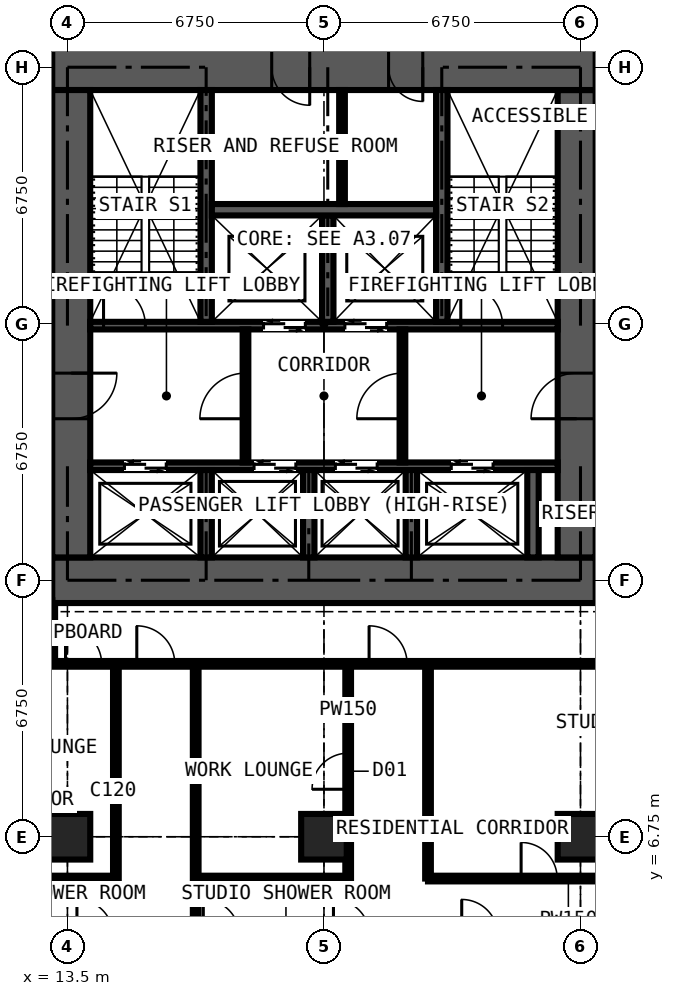
"""IFC4 building model, lengths in metres.
Left out: names, types, materials, properties, quantities, classifications, styles, units other than length and angle.
Written with IfcOpenShell. Run it as: python <this file> out.ifc"""

import sys

from ifc_helpers import new_model, si_unit, direction, frame, frame_2d, origin, origin_2d, place, context, subcontext, project, spatial, rectangle, extrude, element, fill, save


model = new_model("IFC4")
c1 = context("Model", 3, precision=1e-05, world=origin(), true_north=direction((0.0, 1.0)))
c2 = subcontext(c1, "Body", "Model", "MODEL_VIEW")
j1 = project(units=[si_unit("LENGTHUNIT", "METRE"), si_unit("PLANEANGLEUNIT", "RADIAN")], contexts=[c1])
p1 = place(None, origin())
s1 = spatial("IfcSite", under=j1, at=p1, CompositionType="ELEMENT")
p2 = place(p1, origin())
s2 = spatial("IfcBuilding", under=s1, at=p2, CompositionType="ELEMENT")
p3 = place(p2, frame((0.0, 0.0, 185.4)))
s3 = spatial("IfcBuildingStorey", under=s2, at=p3, CompositionType="ELEMENT", Elevation=185.4)
for number, where, z_axis, x_axis in (
    (1, (13.5, 6.75, 0.0), (0.0, 0.0, 1.0), (1.0, 0.0, 0.0)),
    (2, (20.25, 6.75, 0.0), (0.0, 0.0, 1.0), (1.0, 0.0, 0.0)),
    (3, (27.0, 6.75, 0.0), (0.0, 0.0, 1.0), (1.0, 0.0, 0.0)),
):
    element("IfcColumn", number, at=place(p3, frame(where, z_axis=z_axis, x_axis=x_axis)), inside=s3, PredefinedType="COLUMN", context=c2, shape_type="SweptSolid", body=[
        extrude(rectangle(XDim=1.2, YDim=1.2, at=origin_2d()), origin(), (0.0, 0.0, 1.0), 3.6),
    ])
p4 = place(p3, frame((13.1, 13.5, 0.0), z_axis=(0.0, 0.0, 1.0), x_axis=(1.0, 0.0, 0.0)))
e4 = element("IfcWall", 4, at=p4, inside=s3, PredefinedType="SHEAR", context=c2, shape_type="SweptSolid", body=[
    extrude(rectangle(XDim=14.3, YDim=1.2, at=frame_2d((7.15, 0.0))), origin(), (0.0, 0.0, 1.0), 3.6),
])
p5 = place(p3, frame((26.9, 14.1, 0.0), z_axis=(0.0, 0.0, 1.0), x_axis=(0.0, 1.0, 0.0)))
e5 = element("IfcWall", 5, at=p5, inside=s3, PredefinedType="SHEAR", context=c2, shape_type="SweptSolid", body=[
    extrude(rectangle(XDim=12.3, YDim=1.0, at=frame_2d((6.15, 0.0))), origin(), (0.0, 0.0, 1.0), 3.6),
])
p6 = place(p5, frame((3.65, 0.0, 0.0)))
e6 = element("IfcOpeningElement", 6, at=p6, cuts=e5, PredefinedType="OPENING", context=c2, shape_type="SweptSolid", body=[
    extrude(rectangle(XDim=1.2, YDim=2.2, at=frame_2d((0.6, 1.1))), frame((0.0, 0.51, 0.0), z_axis=(0.0, -1.0, 0.0), x_axis=(1.0, 0.0, 0.0)), (0.0, 0.0, 1.0), 1.02),
])
p7 = place(p3, frame((27.4, 27.0, 0.0), z_axis=(0.0, 0.0, 1.0), x_axis=(-1.0, 0.0, 0.0)))
e7 = element("IfcWall", 7, at=p7, inside=s3, PredefinedType="SHEAR", context=c2, shape_type="SweptSolid", body=[
    extrude(rectangle(XDim=14.3, YDim=1.2, at=frame_2d((7.15, 0.0))), origin(), (0.0, 0.0, 1.0), 3.6),
])
p8 = place(p7, frame((4.55, 0.0, 0.0)))
e8 = element("IfcOpeningElement", 8, at=p8, cuts=e7, PredefinedType="OPENING", context=c2, shape_type="SweptSolid", body=[
    extrude(rectangle(XDim=0.9, YDim=2.2, at=frame_2d((0.45, 1.1))), frame((0.0, 0.61, 0.0), z_axis=(0.0, -1.0, 0.0), x_axis=(1.0, 0.0, 0.0)), (0.0, 0.0, 1.0), 1.22),
])
p9 = place(p7, frame((7.525, 0.0, 0.0)))
e9 = element("IfcOpeningElement", 9, at=p9, cuts=e7, PredefinedType="OPENING", context=c2, shape_type="SweptSolid", body=[
    extrude(rectangle(XDim=1.0, YDim=2.2, at=frame_2d((0.5, 1.1))), frame((0.0, 0.61, 0.0), z_axis=(0.0, -1.0, 0.0), x_axis=(1.0, 0.0, 0.0)), (0.0, 0.0, 1.0), 1.22),
])
p10 = place(p3, frame((13.6, 26.4, 0.0), z_axis=(0.0, 0.0, 1.0), x_axis=(0.0, -1.0, 0.0)))
e10 = element("IfcWall", 10, at=p10, inside=s3, PredefinedType="SHEAR", context=c2, shape_type="SweptSolid", body=[
    extrude(rectangle(XDim=12.3, YDim=1.0, at=frame_2d((6.15, 0.0))), origin(), (0.0, 0.0, 1.0), 3.6),
])
p11 = place(p10, frame((7.45, 0.0, 0.0)))
e11 = element("IfcOpeningElement", 11, at=p11, cuts=e10, PredefinedType="OPENING", context=c2, shape_type="SweptSolid", body=[
    extrude(rectangle(XDim=1.2, YDim=2.2, at=frame_2d((0.6, 1.1))), frame((0.0, 0.51, 0.0), z_axis=(0.0, -1.0, 0.0), x_axis=(1.0, 0.0, 0.0)), (0.0, 0.0, 1.0), 1.02),
])
p12 = place(p3, frame((14.1, 16.5, 0.0), z_axis=(0.0, 0.0, 1.0), x_axis=(1.0, 0.0, 0.0)))
e12 = element("IfcWall", 12, at=p12, inside=s3, PredefinedType="SHEAR", context=c2, shape_type="SweptSolid", body=[
    extrude(rectangle(XDim=12.3, YDim=0.2, at=frame_2d((6.15, 0.0))), origin(), (0.0, 0.0, 1.0), 3.6),
])
p13 = place(p12, frame((0.9, 0.0, 0.0)))
e13 = element("IfcOpeningElement", 13, at=p13, cuts=e12, PredefinedType="OPENING", context=c2, shape_type="SweptSolid", body=[
    extrude(rectangle(XDim=1.1, YDim=2.2, at=frame_2d((0.55, 1.1))), frame((0.0, 0.11, 0.0), z_axis=(0.0, -1.0, 0.0), x_axis=(1.0, 0.0, 0.0)), (0.0, 0.0, 1.0), 0.22),
])
p14 = place(p12, frame((4.31, 0.0, 0.0)))
e14 = element("IfcOpeningElement", 14, at=p14, cuts=e12, PredefinedType="OPENING", context=c2, shape_type="SweptSolid", body=[
    extrude(rectangle(XDim=1.1, YDim=2.2, at=frame_2d((0.55, 1.1))), frame((0.0, 0.11, 0.0), z_axis=(0.0, -1.0, 0.0), x_axis=(1.0, 0.0, 0.0)), (0.0, 0.0, 1.0), 0.22),
])
p15 = place(p12, frame((6.45, 0.0, 0.0)))
e15 = element("IfcOpeningElement", 15, at=p15, cuts=e12, PredefinedType="OPENING", context=c2, shape_type="SweptSolid", body=[
    extrude(rectangle(XDim=1.1, YDim=2.2, at=frame_2d((0.55, 1.1))), frame((0.0, 0.11, 0.0), z_axis=(0.0, -1.0, 0.0), x_axis=(1.0, 0.0, 0.0)), (0.0, 0.0, 1.0), 0.22),
])
p16 = place(p12, frame((9.5, 0.0, 0.0)))
e16 = element("IfcOpeningElement", 16, at=p16, cuts=e12, PredefinedType="OPENING", context=c2, shape_type="SweptSolid", body=[
    extrude(rectangle(XDim=1.1, YDim=2.2, at=frame_2d((0.55, 1.1))), frame((0.0, 0.11, 0.0), z_axis=(0.0, -1.0, 0.0), x_axis=(1.0, 0.0, 0.0)), (0.0, 0.0, 1.0), 0.22),
])
p17 = place(p3, frame((14.1, 20.2, 0.0), z_axis=(0.0, 0.0, 1.0), x_axis=(1.0, 0.0, 0.0)))
e17 = element("IfcWall", 17, at=p17, inside=s3, PredefinedType="SHEAR", context=c2, shape_type="SweptSolid", body=[
    extrude(rectangle(XDim=12.3, YDim=0.2, at=frame_2d((6.15, 0.0))), origin(), (0.0, 0.0, 1.0), 3.6),
])
p18 = place(p17, frame((4.56, 0.0, 0.0)))
e18 = element("IfcOpeningElement", 18, at=p18, cuts=e17, PredefinedType="OPENING", context=c2, shape_type="SweptSolid", body=[
    extrude(rectangle(XDim=1.1, YDim=2.2, at=frame_2d((0.55, 1.1))), frame((0.0, 0.11, 0.0), z_axis=(0.0, -1.0, 0.0), x_axis=(1.0, 0.0, 0.0)), (0.0, 0.0, 1.0), 0.22),
])
p19 = place(p17, frame((6.7, 0.0, 0.0)))
e19 = element("IfcOpeningElement", 19, at=p19, cuts=e17, PredefinedType="OPENING", context=c2, shape_type="SweptSolid", body=[
    extrude(rectangle(XDim=1.1, YDim=2.2, at=frame_2d((0.55, 1.1))), frame((0.0, 0.11, 0.0), z_axis=(0.0, -1.0, 0.0), x_axis=(1.0, 0.0, 0.0)), (0.0, 0.0, 1.0), 0.22),
])
p20 = place(p17, frame((0.35, 0.0, 0.0)))
e20 = element("IfcOpeningElement", 20, at=p20, cuts=e17, PredefinedType="OPENING", context=c2, shape_type="SweptSolid", body=[
    extrude(rectangle(XDim=1.1, YDim=2.2, at=frame_2d((0.55, 1.1))), frame((0.0, 0.11, 0.0), z_axis=(0.0, -1.0, 0.0), x_axis=(1.0, 0.0, 0.0)), (0.0, 0.0, 1.0), 0.22),
])
p21 = place(p17, frame((9.75, 0.0, 0.0)))
e21 = element("IfcOpeningElement", 21, at=p21, cuts=e17, PredefinedType="OPENING", context=c2, shape_type="SweptSolid", body=[
    extrude(rectangle(XDim=1.1, YDim=2.2, at=frame_2d((0.55, 1.1))), frame((0.0, 0.11, 0.0), z_axis=(0.0, -1.0, 0.0), x_axis=(1.0, 0.0, 0.0)), (0.0, 0.0, 1.0), 0.22),
])
for number, where, z_axis, x_axis in (
    (22, (17.15, 20.3, 0.0), (0.0, 0.0, 1.0), (0.0, 1.0, 0.0)),
    (23, (23.35, 20.3, 0.0), (0.0, 0.0, 1.0), (0.0, 1.0, 0.0)),
):
    element("IfcWall", number, at=place(p3, frame(where, z_axis=z_axis, x_axis=x_axis)), inside=s3, PredefinedType="SHEAR", context=c2, shape_type="SweptSolid", body=[
        extrude(rectangle(XDim=6.1, YDim=0.3, at=frame_2d((3.05, 0.0))), origin(), (0.0, 0.0, 1.0), 3.6),
    ])
p22 = place(p3, frame((20.35, 20.3, 0.0), z_axis=(0.0, 0.0, 1.0), x_axis=(0.0, 1.0, 0.0)))
e24 = element("IfcWall", 24, at=p22, inside=s3, PredefinedType="SHEAR", context=c2, shape_type="SweptSolid", body=[
    extrude(rectangle(XDim=2.8, YDim=0.3, at=frame_2d((1.4, 0.0))), origin(), (0.0, 0.0, 1.0), 3.6),
])
p23 = place(p3, frame((17.3, 23.25, 0.0), z_axis=(0.0, 0.0, 1.0), x_axis=(1.0, 0.0, 0.0)))
e25 = element("IfcWall", 25, at=p23, inside=s3, PredefinedType="SHEAR", context=c2, shape_type="SweptSolid", body=[
    extrude(rectangle(XDim=5.9, YDim=0.3, at=frame_2d((2.95, 0.0))), origin(), (0.0, 0.0, 1.0), 3.6),
])
for number, where, z_axis, x_axis in (
    (26, (17.15, 14.1, 0.0), (0.0, 0.0, 1.0), (0.0, 1.0, 0.0)),
    (27, (19.85, 14.1, 0.0), (0.0, 0.0, 1.0), (0.0, 1.0, 0.0)),
    (28, (22.55, 14.1, 0.0), (0.0, 0.0, 1.0), (0.0, 1.0, 0.0)),
    (29, (25.75, 14.1, 0.0), (0.0, 0.0, 1.0), (0.0, 1.0, 0.0)),
):
    element("IfcWall", number, at=place(p3, frame(where, z_axis=z_axis, x_axis=x_axis)), inside=s3, PredefinedType="SHEAR", context=c2, shape_type="SweptSolid", body=[
        extrude(rectangle(XDim=2.3, YDim=0.3, at=frame_2d((1.15, 0.0))), origin(), (0.0, 0.0, 1.0), 3.6),
    ])
p24 = place(p3, frame((18.185, 16.6, 0.0), z_axis=(0.0, 0.0, 1.0), x_axis=(0.0, 1.0, 0.0)))
e30 = element("IfcWall", 30, at=p24, inside=s3, PredefinedType="PARTITIONING", context=c2, shape_type="SweptSolid", body=[
    extrude(rectangle(XDim=3.5, YDim=0.15, at=frame_2d((1.75, 0.0))), origin(), (0.0, 0.0, 1.0), 3.375),
])
p25 = place(p24, frame((1.15, 0.0, 0.0)))
e31 = element("IfcOpeningElement", 31, at=p25, cuts=e30, PredefinedType="OPENING", context=c2, shape_type="SweptSolid", body=[
    extrude(rectangle(XDim=1.2, YDim=2.2, at=frame_2d((0.6, 1.1))), frame((0.0, 0.085, 0.0), z_axis=(0.0, -1.0, 0.0), x_axis=(1.0, 0.0, 0.0)), (0.0, 0.0, 1.0), 0.17),
])
p26 = place(p3, frame((22.315, 16.6, 0.0), z_axis=(0.0, 0.0, 1.0), x_axis=(0.0, 1.0, 0.0)))
e32 = element("IfcWall", 32, at=p26, inside=s3, PredefinedType="PARTITIONING", context=c2, shape_type="SweptSolid", body=[
    extrude(rectangle(XDim=3.5, YDim=0.15, at=frame_2d((1.75, 0.0))), origin(), (0.0, 0.0, 1.0), 3.375),
])
p27 = place(p26, frame((1.15, 0.0, 0.0)))
e33 = element("IfcOpeningElement", 33, at=p27, cuts=e32, PredefinedType="OPENING", context=c2, shape_type="SweptSolid", body=[
    extrude(rectangle(XDim=1.2, YDim=2.2, at=frame_2d((0.6, 1.1))), frame((0.0, 0.085, 0.0), z_axis=(0.0, -1.0, 0.0), x_axis=(1.0, 0.0, 0.0)), (0.0, 0.0, 1.0), 0.17),
])
p28 = place(p3, frame((20.725, 23.4, 0.0), z_axis=(0.0, 0.0, 1.0), x_axis=(0.0, 1.0, 0.0)))
e34 = element("IfcWall", 34, at=p28, inside=s3, PredefinedType="PARTITIONING", context=c2, shape_type="SweptSolid", body=[
    extrude(rectangle(XDim=3.0, YDim=0.15, at=frame_2d((1.5, 0.0))), origin(), (0.0, 0.0, 1.0), 3.375),
])
p29 = place(p3, frame((6.75, 5.65, 0.0), z_axis=(0.0, 0.0, 1.0), x_axis=(1.0, 0.0, 0.0)))
e35 = element("IfcWall", 35, at=p29, inside=s3, PredefinedType="PARTITIONING", context=c2, shape_type="SweptSolid", body=[
    extrude(rectangle(XDim=8.025, YDim=0.15, at=frame_2d((4.012, 0.0))), origin(), (0.0, 0.0, 1.0), 3.375),
])
p30 = place(p3, frame((10.125, 11.3, 0.0), z_axis=(0.0, 0.0, 1.0), x_axis=(1.0, 0.0, 0.0)))
e36 = element("IfcWall", 36, at=p30, inside=s3, PredefinedType="PARTITIONING", context=c2, shape_type="SweptSolid", body=[
    extrude(rectangle(XDim=20.25, YDim=0.15, at=frame_2d((10.125, 0.0))), origin(), (0.0, 0.0, 1.0), 3.375),
])
p31 = place(p30, frame((5.2, 0.0, 0.0)))
e37 = element("IfcOpeningElement", 37, at=p31, cuts=e36, PredefinedType="OPENING", context=c2, shape_type="SweptSolid", body=[
    extrude(rectangle(XDim=1.0, YDim=2.2, at=frame_2d((0.5, 1.1))), frame((0.0, 0.085, 0.0), z_axis=(0.0, -1.0, 0.0), x_axis=(1.0, 0.0, 0.0)), (0.0, 0.0, 1.0), 0.17),
])
p32 = place(p30, frame((11.312, 0.0, 0.0)))
e38 = element("IfcOpeningElement", 38, at=p32, cuts=e36, PredefinedType="OPENING", context=c2, shape_type="SweptSolid", body=[
    extrude(rectangle(XDim=1.0, YDim=2.2, at=frame_2d((0.5, 1.1))), frame((0.0, 0.085, 0.0), z_axis=(0.0, -1.0, 0.0), x_axis=(1.0, 0.0, 0.0)), (0.0, 0.0, 1.0), 0.17),
])
p33 = place(p30, frame((3.325, 0.0, 0.0)))
e39 = element("IfcOpeningElement", 39, at=p33, cuts=e36, PredefinedType="OPENING", context=c2, shape_type="SweptSolid", body=[
    extrude(rectangle(XDim=0.95, YDim=2.2, at=frame_2d((0.475, 1.1))), frame((0.0, 0.085, 0.0), z_axis=(0.0, -1.0, 0.0), x_axis=(1.0, 0.0, 0.0)), (0.0, 0.0, 1.0), 0.17),
])
p34 = place(p3, frame((13.1, 11.3, 0.0), z_axis=(0.0, 0.0, 1.0), x_axis=(0.0, 1.0, 0.0)))
e40 = element("IfcWall", 40, at=p34, inside=s3, PredefinedType="PARTITIONING", context=c2, shape_type="SweptSolid", body=[
    extrude(rectangle(XDim=1.6, YDim=0.15, at=frame_2d((0.8, 0.0))), origin(), (0.0, 0.0, 1.0), 3.375),
])
p35 = place(p3, frame((14.775, 5.65, 0.0), z_axis=(0.0, 0.0, 1.0), x_axis=(0.0, 1.0, 0.0)))
e41 = element("IfcWall", 41, at=p35, inside=s3, PredefinedType="PARTITIONING", context=c2, shape_type="SweptSolid", body=[
    extrude(rectangle(XDim=5.65, YDim=0.15, at=frame_2d((2.825, 0.0))), origin(), (0.0, 0.0, 1.0), 3.375),
])
p36 = place(p3, frame((16.875, -0.734, 0.0), z_axis=(0.0, 0.0, 1.0), x_axis=(0.0, 1.0, 0.0)))
e42 = element("IfcWall", 42, at=p36, inside=s3, PredefinedType="PARTITIONING", context=c2, shape_type="SweptSolid", body=[
    extrude(rectangle(XDim=12.034, YDim=0.15, at=frame_2d((6.017, 0.0))), origin(), (0.0, 0.0, 1.0), 3.375),
])
p37 = place(p3, frame((16.875, 5.65, 0.0), z_axis=(0.0, 0.0, 1.0), x_axis=(1.0, 0.0, 0.0)))
e43 = element("IfcWall", 43, at=p37, inside=s3, PredefinedType="PARTITIONING", context=c2, shape_type="SweptSolid", body=[
    extrude(rectangle(XDim=4.012, YDim=0.15, at=frame_2d((2.006, 0.0))), origin(), (0.0, 0.0, 1.0), 3.375),
])
p38 = place(p3, frame((20.887, 5.65, 0.0), z_axis=(0.0, 0.0, 1.0), x_axis=(0.0, 1.0, 0.0)))
e44 = element("IfcWall", 44, at=p38, inside=s3, PredefinedType="PARTITIONING", context=c2, shape_type="SweptSolid", body=[
    extrude(rectangle(XDim=5.65, YDim=0.15, at=frame_2d((2.825, 0.0))), origin(), (0.0, 0.0, 1.0), 3.375),
])
p39 = place(p38, frame((2.35, 0.0, 0.0)))
e45 = element("IfcOpeningElement", 45, at=p39, cuts=e44, PredefinedType="OPENING", context=c2, shape_type="SweptSolid", body=[
    extrude(rectangle(XDim=0.95, YDim=2.2, at=frame_2d((0.475, 1.1))), frame((0.0, 0.085, 0.0), z_axis=(0.0, -1.0, 0.0), x_axis=(1.0, 0.0, 0.0)), (0.0, 0.0, 1.0), 0.17),
])
p40 = place(p3, frame((22.988, 5.65, 0.0), z_axis=(0.0, 0.0, 1.0), x_axis=(1.0, 0.0, 0.0)))
e46 = element("IfcWall", 46, at=p40, inside=s3, PredefinedType="PARTITIONING", context=c2, shape_type="SweptSolid", body=[
    extrude(rectangle(XDim=7.387, YDim=0.15, at=frame_2d((3.694, 0.0))), origin(), (0.0, 0.0, 1.0), 3.375),
])
p41 = place(p40, frame((2.45, 0.0, 0.0)))
e47 = element("IfcOpeningElement", 47, at=p41, cuts=e46, PredefinedType="OPENING", context=c2, shape_type="SweptSolid", body=[
    extrude(rectangle(XDim=0.95, YDim=2.2, at=frame_2d((0.475, 1.1))), frame((0.0, 0.085, 0.0), z_axis=(0.0, -1.0, 0.0), x_axis=(1.0, 0.0, 0.0)), (0.0, 0.0, 1.0), 0.17),
])
p42 = place(p3, frame((22.988, 5.65, 0.0), z_axis=(0.0, 0.0, 1.0), x_axis=(0.0, 1.0, 0.0)))
e48 = element("IfcWall", 48, at=p42, inside=s3, PredefinedType="PARTITIONING", context=c2, shape_type="SweptSolid", body=[
    extrude(rectangle(XDim=5.65, YDim=0.15, at=frame_2d((2.825, 0.0))), origin(), (0.0, 0.0, 1.0), 3.375),
])
p43 = place(p13, origin())
e49 = element("IfcDoor", 49, at=p43, inside=s3, OperationType="DOUBLE_DOOR_SLIDING", PredefinedType="DOOR", context=c2, shape_type="SweptSolid", body=[
    extrude(rectangle(XDim=1.1, YDim=2.2, at=frame_2d((0.55, 1.1))), frame((0.0, 0.025, 0.0), z_axis=(0.0, -1.0, 0.0), x_axis=(1.0, 0.0, 0.0)), (0.0, 0.0, 1.0), 0.05),
])
fill(e13, e49)
p44 = place(p14, origin())
e50 = element("IfcDoor", 50, at=p44, inside=s3, OperationType="DOUBLE_DOOR_SLIDING", PredefinedType="DOOR", context=c2, shape_type="SweptSolid", body=[
    extrude(rectangle(XDim=1.1, YDim=2.2, at=frame_2d((0.55, 1.1))), frame((0.0, 0.025, 0.0), z_axis=(0.0, -1.0, 0.0), x_axis=(1.0, 0.0, 0.0)), (0.0, 0.0, 1.0), 0.05),
])
fill(e14, e50)
p45 = place(p15, origin())
e51 = element("IfcDoor", 51, at=p45, inside=s3, OperationType="DOUBLE_DOOR_SLIDING", PredefinedType="DOOR", context=c2, shape_type="SweptSolid", body=[
    extrude(rectangle(XDim=1.1, YDim=2.2, at=frame_2d((0.55, 1.1))), frame((0.0, 0.025, 0.0), z_axis=(0.0, -1.0, 0.0), x_axis=(1.0, 0.0, 0.0)), (0.0, 0.0, 1.0), 0.05),
])
fill(e15, e51)
p46 = place(p16, origin())
e52 = element("IfcDoor", 52, at=p46, inside=s3, OperationType="DOUBLE_DOOR_SLIDING", PredefinedType="DOOR", context=c2, shape_type="SweptSolid", body=[
    extrude(rectangle(XDim=1.1, YDim=2.2, at=frame_2d((0.55, 1.1))), frame((0.0, 0.025, 0.0), z_axis=(0.0, -1.0, 0.0), x_axis=(1.0, 0.0, 0.0)), (0.0, 0.0, 1.0), 0.05),
])
fill(e16, e52)
p47 = place(p18, origin())
e53 = element("IfcDoor", 53, at=p47, inside=s3, OperationType="DOUBLE_DOOR_SLIDING", PredefinedType="DOOR", context=c2, shape_type="SweptSolid", body=[
    extrude(rectangle(XDim=1.1, YDim=2.2, at=frame_2d((0.55, 1.1))), frame((0.0, 0.025, 0.0), z_axis=(0.0, -1.0, 0.0), x_axis=(1.0, 0.0, 0.0)), (0.0, 0.0, 1.0), 0.05),
])
fill(e18, e53)
p48 = place(p19, origin())
e54 = element("IfcDoor", 54, at=p48, inside=s3, OperationType="DOUBLE_DOOR_SLIDING", PredefinedType="DOOR", context=c2, shape_type="SweptSolid", body=[
    extrude(rectangle(XDim=1.1, YDim=2.2, at=frame_2d((0.55, 1.1))), frame((0.0, 0.025, 0.0), z_axis=(0.0, -1.0, 0.0), x_axis=(1.0, 0.0, 0.0)), (0.0, 0.0, 1.0), 0.05),
])
fill(e19, e54)
p49 = place(p11, origin())
e55 = element("IfcDoor", 55, at=p49, inside=s3, OperationType="DOUBLE_DOOR_SINGLE_SWING", PredefinedType="DOOR", context=c2, shape_type="SweptSolid", body=[
    extrude(rectangle(XDim=1.2, YDim=2.2, at=frame_2d((0.6, 1.1))), frame((0.0, 0.025, 0.0), z_axis=(0.0, -1.0, 0.0), x_axis=(1.0, 0.0, 0.0)), (0.0, 0.0, 1.0), 0.05),
])
fill(e11, e55)
p50 = place(p6, origin())
e56 = element("IfcDoor", 56, at=p50, inside=s3, OperationType="DOUBLE_DOOR_SINGLE_SWING", PredefinedType="DOOR", context=c2, shape_type="SweptSolid", body=[
    extrude(rectangle(XDim=1.2, YDim=2.2, at=frame_2d((0.6, 1.1))), frame((0.0, 0.025, 0.0), z_axis=(0.0, -1.0, 0.0), x_axis=(1.0, 0.0, 0.0)), (0.0, 0.0, 1.0), 0.05),
])
fill(e6, e56)
p51 = place(p25, origin())
e57 = element("IfcDoor", 57, at=p51, inside=s3, OperationType="DOUBLE_DOOR_SINGLE_SWING", PredefinedType="DOOR", context=c2, shape_type="SweptSolid", body=[
    extrude(rectangle(XDim=1.2, YDim=2.2, at=frame_2d((0.6, 1.1))), frame((0.0, 0.025, 0.0), z_axis=(0.0, -1.0, 0.0), x_axis=(1.0, 0.0, 0.0)), (0.0, 0.0, 1.0), 0.05),
])
fill(e31, e57)
p52 = place(p27, origin())
e58 = element("IfcDoor", 58, at=p52, inside=s3, OperationType="DOUBLE_DOOR_SINGLE_SWING", PredefinedType="DOOR", context=c2, shape_type="SweptSolid", body=[
    extrude(rectangle(XDim=1.2, YDim=2.2, at=frame_2d((0.6, 1.1))), frame((0.0, 0.025, 0.0), z_axis=(0.0, -1.0, 0.0), x_axis=(1.0, 0.0, 0.0)), (0.0, 0.0, 1.0), 0.05),
])
fill(e33, e58)
p53 = place(p8, origin())
e59 = element("IfcDoor", 59, at=p53, inside=s3, OperationType="SINGLE_SWING_LEFT", PredefinedType="DOOR", context=c2, shape_type="SweptSolid", body=[
    extrude(rectangle(XDim=0.9, YDim=2.2, at=frame_2d((0.45, 1.1))), frame((0.0, 0.4, 0.0), z_axis=(0.0, -1.0, 0.0), x_axis=(1.0, 0.0, 0.0)), (0.0, 0.0, 1.0), 0.8),
])
fill(e8, e59)
p54 = place(p9, origin())
e60 = element("IfcDoor", 60, at=p54, inside=s3, OperationType="SINGLE_SWING_LEFT", PredefinedType="DOOR", context=c2, shape_type="SweptSolid", body=[
    extrude(rectangle(XDim=1.0, YDim=2.2, at=frame_2d((0.5, 1.1))), frame((0.0, 0.025, 0.0), z_axis=(0.0, -1.0, 0.0), x_axis=(1.0, 0.0, 0.0)), (0.0, 0.0, 1.0), 0.05),
])
fill(e9, e60)
p55 = place(p20, origin())
e61 = element("IfcDoor", 61, at=p55, inside=s3, OperationType="SINGLE_SWING_LEFT", PredefinedType="DOOR", context=c2, shape_type="SweptSolid", body=[
    extrude(rectangle(XDim=1.1, YDim=2.2, at=frame_2d((0.55, 1.1))), frame((0.0, 0.025, 0.0), z_axis=(0.0, -1.0, 0.0), x_axis=(1.0, 0.0, 0.0)), (0.0, 0.0, 1.0), 0.05),
])
fill(e20, e61)
p56 = place(p21, origin())
e62 = element("IfcDoor", 62, at=p56, inside=s3, OperationType="SINGLE_SWING_LEFT", PredefinedType="DOOR", context=c2, shape_type="SweptSolid", body=[
    extrude(rectangle(XDim=1.1, YDim=2.2, at=frame_2d((0.55, 1.1))), frame((0.0, 0.025, 0.0), z_axis=(0.0, -1.0, 0.0), x_axis=(1.0, 0.0, 0.0)), (0.0, 0.0, 1.0), 0.05),
])
fill(e21, e62)
p57 = place(p31, origin())
e63 = element("IfcDoor", 63, at=p57, inside=s3, OperationType="SINGLE_SWING_LEFT", PredefinedType="DOOR", context=c2, shape_type="SweptSolid", body=[
    extrude(rectangle(XDim=1.0, YDim=2.2, at=frame_2d((0.5, 1.1))), frame((0.0, 0.025, 0.0), z_axis=(0.0, -1.0, 0.0), x_axis=(1.0, 0.0, 0.0)), (0.0, 0.0, 1.0), 0.05),
])
fill(e37, e63)
p58 = place(p32, origin())
e64 = element("IfcDoor", 64, at=p58, inside=s3, OperationType="SINGLE_SWING_LEFT", PredefinedType="DOOR", context=c2, shape_type="SweptSolid", body=[
    extrude(rectangle(XDim=1.0, YDim=2.2, at=frame_2d((0.5, 1.1))), frame((0.0, 0.025, 0.0), z_axis=(0.0, -1.0, 0.0), x_axis=(1.0, 0.0, 0.0)), (0.0, 0.0, 1.0), 0.05),
])
fill(e38, e64)
p59 = place(p33, origin())
e65 = element("IfcDoor", 65, at=p59, inside=s3, OperationType="SINGLE_SWING_LEFT", PredefinedType="DOOR", context=c2, shape_type="SweptSolid", body=[
    extrude(rectangle(XDim=0.95, YDim=2.2, at=frame_2d((0.475, 1.1))), frame((0.0, 0.025, 0.0), z_axis=(0.0, -1.0, 0.0), x_axis=(1.0, 0.0, 0.0)), (0.0, 0.0, 1.0), 0.05),
])
fill(e39, e65)
p60 = place(p39, origin())
e66 = element("IfcDoor", 66, at=p60, inside=s3, OperationType="SINGLE_SWING_LEFT", PredefinedType="DOOR", context=c2, shape_type="SweptSolid", body=[
    extrude(rectangle(XDim=0.95, YDim=2.2, at=frame_2d((0.475, 1.1))), frame((0.0, 0.025, 0.0), z_axis=(0.0, -1.0, 0.0), x_axis=(1.0, 0.0, 0.0)), (0.0, 0.0, 1.0), 0.05),
])
fill(e45, e66)
p61 = place(p41, origin())
e67 = element("IfcDoor", 67, at=p61, inside=s3, OperationType="SINGLE_SWING_LEFT", PredefinedType="DOOR", context=c2, shape_type="SweptSolid", body=[
    extrude(rectangle(XDim=0.95, YDim=2.2, at=frame_2d((0.475, 1.1))), frame((0.0, 0.025, 0.0), z_axis=(0.0, -1.0, 0.0), x_axis=(1.0, 0.0, 0.0)), (0.0, 0.0, 1.0), 0.05),
])
fill(e47, e67)
save(model, sys.argv[1])
